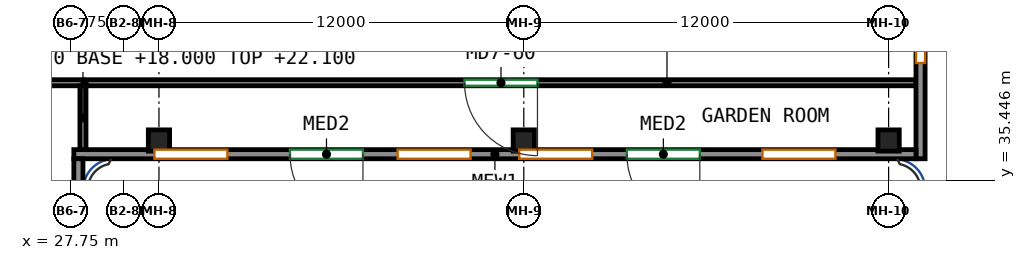
"""IFC4 building model, lengths in metres.
Left out: names, types, materials, properties, quantities, classifications, styles, units other than length and angle.
Written with IfcOpenShell. Run it as: python <this file> out.ifc"""

import sys

from ifc_helpers import new_model, si_unit, direction, frame, frame_2d, origin, origin_2d, place, context, subcontext, project, spatial, rectangle, extrude, source, transform, mapped, element, fill, save


model = new_model("IFC4")
c1 = context("Model", 3, precision=1e-05, world=origin(), true_north=direction((0.0, 1.0)))
c2 = subcontext(c1, "Body", "Model", "MODEL_VIEW")
j1 = project(units=[si_unit("LENGTHUNIT", "METRE"), si_unit("PLANEANGLEUNIT", "RADIAN")], contexts=[c1])
p1 = place(None, origin())
s1 = spatial("IfcSite", under=j1, at=p1, CompositionType="ELEMENT")
p2 = place(p1, origin())
s2 = spatial("IfcBuilding", under=s1, at=p2, CompositionType="ELEMENT")
p3 = place(p2, frame((0.0, 0.0, 18.0)))
s3 = spatial("IfcBuildingStorey", under=s2, at=p3, CompositionType="ELEMENT", Elevation=18.0)
m1 = source(origin(), c2, "Body", "SweptSolid", [
    extrude(rectangle(XDim=0.7, YDim=0.7, at=origin_2d()), origin(), (0.0, 0.0, 1.0), 4.1),
])
for number, where, z_axis, x_axis in (
    (1, (30.65, 36.75, 0.0), (0.0, 0.0, 1.0), (1.0, 0.0, 0.0)),
    (2, (42.65, 36.75, 0.0), (0.0, 0.0, 1.0), (1.0, 0.0, 0.0)),
    (3, (54.65, 36.75, 0.0), (0.0, 0.0, 1.0), (1.0, 0.0, 0.0)),
):
    element("IfcColumn", number, at=place(p3, frame(where, z_axis=z_axis, x_axis=x_axis)), inside=s3, PredefinedType="COLUMN", context=c2, shape_type="MappedRepresentation", body=[
        mapped(m1, transform((0.0, 0.0, 0.0))),
    ])
m2 = source(origin(), c2, "Body", "SweptSolid", [
    extrude(rectangle(XDim=20.7, YDim=0.3, at=frame_2d((10.35, 0.0))), origin(), (0.0, 0.0, 1.0), 4.1),
])
p4 = place(p3, frame((55.7, 56.85, 0.0), z_axis=(0.0, 0.0, 1.0), x_axis=(0.0, -1.0, 0.0)))
e4 = element("IfcWall", 4, at=p4, inside=s3, PredefinedType="SOLIDWALL", context=c2, shape_type="MappedRepresentation", body=[
    mapped(m2, transform((0.0, 0.0, 0.0))),
])
p5 = place(p4, frame((3.15, 0.0, 0.9)))
e5 = element("IfcOpeningElement", 5, at=p5, cuts=e4, PredefinedType="OPENING", context=c2, shape_type="SweptSolid", body=[
    extrude(rectangle(XDim=2.4, YDim=1.8, at=frame_2d((1.2, 0.9))), frame((0.0, 0.16, 0.0), z_axis=(0.0, -1.0, 0.0), x_axis=(1.0, 0.0, 0.0)), (0.0, 0.0, 1.0), 0.32),
])
p6 = place(p4, frame((7.15, 0.0, 0.9)))
e6 = element("IfcOpeningElement", 6, at=p6, cuts=e4, PredefinedType="OPENING", context=c2, shape_type="SweptSolid", body=[
    extrude(rectangle(XDim=2.4, YDim=1.8, at=frame_2d((1.2, 0.9))), frame((0.0, 0.16, 0.0), z_axis=(0.0, -1.0, 0.0), x_axis=(1.0, 0.0, 0.0)), (0.0, 0.0, 1.0), 0.32),
])
p7 = place(p4, frame((11.15, 0.0, 0.9)))
e7 = element("IfcOpeningElement", 7, at=p7, cuts=e4, PredefinedType="OPENING", context=c2, shape_type="SweptSolid", body=[
    extrude(rectangle(XDim=2.4, YDim=1.8, at=frame_2d((1.2, 0.9))), frame((0.0, 0.16, 0.0), z_axis=(0.0, -1.0, 0.0), x_axis=(1.0, 0.0, 0.0)), (0.0, 0.0, 1.0), 0.32),
])
p8 = place(p4, frame((15.15, 0.0, 0.9)))
e8 = element("IfcOpeningElement", 8, at=p8, cuts=e4, PredefinedType="OPENING", context=c2, shape_type="SweptSolid", body=[
    extrude(rectangle(XDim=2.4, YDim=1.8, at=frame_2d((1.2, 0.9))), frame((0.0, 0.16, 0.0), z_axis=(0.0, -1.0, 0.0), x_axis=(1.0, 0.0, 0.0)), (0.0, 0.0, 1.0), 0.32),
])
m3 = source(origin(), c2, "Body", "SweptSolid", [
    extrude(rectangle(XDim=27.7, YDim=0.3, at=frame_2d((13.85, 0.0))), origin(), (0.0, 0.0, 1.0), 4.1),
])
p9 = place(p3, frame((55.55, 36.3, 0.0), z_axis=(0.0, 0.0, 1.0), x_axis=(-1.0, 0.0, 0.0)))
e9 = element("IfcWall", 9, at=p9, inside=s3, PredefinedType="SOLIDWALL", context=c2, shape_type="MappedRepresentation", body=[
    mapped(m3, transform((0.0, 0.0, 0.0))),
])
p10 = place(p9, frame((7.11, 0.0, 0.0)))
e10 = element("IfcOpeningElement", 10, at=p10, cuts=e9, PredefinedType="OPENING", context=c2, shape_type="SweptSolid", body=[
    extrude(rectangle(XDim=2.4, YDim=2.4, at=frame_2d((1.2, 1.2))), frame((0.0, 0.16, 0.0), z_axis=(0.0, -1.0, 0.0), x_axis=(1.0, 0.0, 0.0)), (0.0, 0.0, 1.0), 0.32),
])
p11 = place(p9, frame((18.19, 0.0, 0.0)))
e11 = element("IfcOpeningElement", 11, at=p11, cuts=e9, PredefinedType="OPENING", context=c2, shape_type="SweptSolid", body=[
    extrude(rectangle(XDim=2.4, YDim=2.4, at=frame_2d((1.2, 1.2))), frame((0.0, 0.16, 0.0), z_axis=(0.0, -1.0, 0.0), x_axis=(1.0, 0.0, 0.0)), (0.0, 0.0, 1.0), 0.32),
])
p12 = place(p9, frame((2.65, 0.0, 0.9)))
e12 = element("IfcOpeningElement", 12, at=p12, cuts=e9, PredefinedType="OPENING", context=c2, shape_type="SweptSolid", body=[
    extrude(rectangle(XDim=2.4, YDim=1.8, at=frame_2d((1.2, 0.9))), frame((0.0, 0.16, 0.0), z_axis=(0.0, -1.0, 0.0), x_axis=(1.0, 0.0, 0.0)), (0.0, 0.0, 1.0), 0.32),
])
p13 = place(p9, frame((10.65, 0.0, 0.9)))
e13 = element("IfcOpeningElement", 13, at=p13, cuts=e9, PredefinedType="OPENING", context=c2, shape_type="SweptSolid", body=[
    extrude(rectangle(XDim=2.4, YDim=1.8, at=frame_2d((1.2, 0.9))), frame((0.0, 0.16, 0.0), z_axis=(0.0, -1.0, 0.0), x_axis=(1.0, 0.0, 0.0)), (0.0, 0.0, 1.0), 0.32),
])
p14 = place(p9, frame((14.65, 0.0, 0.9)))
e14 = element("IfcOpeningElement", 14, at=p14, cuts=e9, PredefinedType="OPENING", context=c2, shape_type="SweptSolid", body=[
    extrude(rectangle(XDim=2.4, YDim=1.8, at=frame_2d((1.2, 0.9))), frame((0.0, 0.16, 0.0), z_axis=(0.0, -1.0, 0.0), x_axis=(1.0, 0.0, 0.0)), (0.0, 0.0, 1.0), 0.32),
])
p15 = place(p9, frame((22.65, 0.0, 0.9)))
e15 = element("IfcOpeningElement", 15, at=p15, cuts=e9, PredefinedType="OPENING", context=c2, shape_type="SweptSolid", body=[
    extrude(rectangle(XDim=2.4, YDim=1.8, at=frame_2d((1.2, 0.9))), frame((0.0, 0.16, 0.0), z_axis=(0.0, -1.0, 0.0), x_axis=(1.0, 0.0, 0.0)), (0.0, 0.0, 1.0), 0.32),
])
m4 = source(origin(), c2, "Body", "SweptSolid", [
    extrude(rectangle(XDim=8.0, YDim=0.3, at=frame_2d((4.0, 0.0))), origin(), (0.0, 0.0, 1.0), 4.1),
])
p16 = place(p3, frame((28.0, 36.15, 0.0), z_axis=(0.0, 0.0, 1.0), x_axis=(0.0, -1.0, 0.0)))
e16 = element("IfcWall", 16, at=p16, inside=s3, PredefinedType="SOLIDWALL", context=c2, shape_type="MappedRepresentation", body=[
    mapped(m4, transform((0.0, 0.0, 0.0))),
])
p17 = place(p16, frame((2.8, 0.0, 0.9)))
e17 = element("IfcOpeningElement", 17, at=p17, cuts=e16, PredefinedType="OPENING", context=c2, shape_type="SweptSolid", body=[
    extrude(rectangle(XDim=2.4, YDim=1.8, at=frame_2d((1.2, 0.9))), frame((0.0, 0.16, 0.0), z_axis=(0.0, -1.0, 0.0), x_axis=(1.0, 0.0, 0.0)), (0.0, 0.0, 1.0), 0.32),
])
m5 = source(origin(), c2, "Body", "SweptSolid", [
    extrude(rectangle(XDim=18.05, YDim=0.2, at=frame_2d((9.025, 0.0))), origin(), (0.0, 0.0, 1.0), 3.3),
])
p18 = place(p3, frame((28.15, 38.65, 0.0), z_axis=(0.0, 0.0, 1.0), x_axis=(-1.0, 0.0, 0.0)))
e18 = element("IfcWall", 18, at=p18, inside=s3, PredefinedType="PARTITIONING", context=c2, shape_type="MappedRepresentation", body=[
    mapped(m5, transform((0.0, 0.0, 0.0))),
])
p19 = place(p18, frame((7.825, 0.0, 0.0)))
e19 = element("IfcOpeningElement", 19, at=p19, cuts=e18, PredefinedType="OPENING", context=c2, shape_type="SweptSolid", body=[
    extrude(rectangle(XDim=2.4, YDim=2.4, at=frame_2d((1.2, 1.2))), frame((0.0, 0.11, 0.0), z_axis=(0.0, -1.0, 0.0), x_axis=(1.0, 0.0, 0.0)), (0.0, 0.0, 1.0), 0.22),
])
m6 = source(origin(), c2, "Body", "SweptSolid", [
    extrude(rectangle(XDim=2.1, YDim=0.2, at=frame_2d((1.05, 0.0))), origin(), (0.0, 0.0, 1.0), 4.1),
])
p20 = place(p3, frame((28.15, 38.55, 0.0), z_axis=(0.0, 0.0, 1.0), x_axis=(0.0, -1.0, 0.0)))
e20 = element("IfcWall", 20, at=p20, inside=s3, PredefinedType="PARTITIONING", context=c2, shape_type="MappedRepresentation", body=[
    mapped(m6, transform((0.0, 0.0, 0.0))),
])
m7 = source(origin(), c2, "Body", "SweptSolid", [
    extrude(rectangle(XDim=27.3, YDim=0.2, at=frame_2d((13.65, 0.0))), origin(), (0.0, 0.0, 1.0), 2.8),
])
p21 = place(p3, frame((55.55, 38.65, 0.0), z_axis=(0.0, 0.0, 1.0), x_axis=(-1.0, 0.0, 0.0)))
e21 = element("IfcWall", 21, at=p21, inside=s3, PredefinedType="PARTITIONING", context=c2, shape_type="MappedRepresentation", body=[
    mapped(m7, transform((0.0, 0.0, 0.0))),
])
p22 = place(p21, frame((12.45, 0.0, 0.0)))
e22 = element("IfcOpeningElement", 22, at=p22, cuts=e21, PredefinedType="OPENING", context=c2, shape_type="SweptSolid", body=[
    extrude(rectangle(XDim=2.4, YDim=2.4, at=frame_2d((1.2, 1.2))), frame((0.0, 0.11, 0.0), z_axis=(0.0, -1.0, 0.0), x_axis=(1.0, 0.0, 0.0)), (0.0, 0.0, 1.0), 0.22),
])
p23 = place(p10, origin())
e23 = element("IfcDoor", 23, at=p23, inside=s3, OperationType="DOUBLE_DOOR_SINGLE_SWING", PredefinedType="DOOR", context=c2, shape_type="SweptSolid", body=[
    extrude(rectangle(XDim=2.4, YDim=2.4, at=frame_2d((1.2, 1.2))), frame((0.0, 0.025, 0.0), z_axis=(0.0, -1.0, 0.0), x_axis=(1.0, 0.0, 0.0)), (0.0, 0.0, 1.0), 0.05),
])
fill(e10, e23)
p24 = place(p11, origin())
e24 = element("IfcDoor", 24, at=p24, inside=s3, OperationType="DOUBLE_DOOR_SINGLE_SWING", PredefinedType="DOOR", context=c2, shape_type="SweptSolid", body=[
    extrude(rectangle(XDim=2.4, YDim=2.4, at=frame_2d((1.2, 1.2))), frame((0.0, 0.025, 0.0), z_axis=(0.0, -1.0, 0.0), x_axis=(1.0, 0.0, 0.0)), (0.0, 0.0, 1.0), 0.05),
])
fill(e11, e24)
p25 = place(p8, origin())
e25 = element("IfcWindow", 25, at=p25, inside=s3, PartitioningType="SINGLE_PANEL", PredefinedType="WINDOW", context=c2, shape_type="SweptSolid", body=[
    extrude(rectangle(XDim=2.4, YDim=1.8, at=frame_2d((1.2, 0.9))), frame((0.0, 0.03, 0.0), z_axis=(0.0, -1.0, 0.0), x_axis=(1.0, 0.0, 0.0)), (0.0, 0.0, 1.0), 0.06),
])
fill(e8, e25)
p26 = place(p12, origin())
e26 = element("IfcWindow", 26, at=p26, inside=s3, PartitioningType="SINGLE_PANEL", PredefinedType="WINDOW", context=c2, shape_type="SweptSolid", body=[
    extrude(rectangle(XDim=2.4, YDim=1.8, at=frame_2d((1.2, 0.9))), frame((0.0, 0.03, 0.0), z_axis=(0.0, -1.0, 0.0), x_axis=(1.0, 0.0, 0.0)), (0.0, 0.0, 1.0), 0.06),
])
fill(e12, e26)
p27 = place(p13, origin())
e27 = element("IfcWindow", 27, at=p27, inside=s3, PartitioningType="SINGLE_PANEL", PredefinedType="WINDOW", context=c2, shape_type="SweptSolid", body=[
    extrude(rectangle(XDim=2.4, YDim=1.8, at=frame_2d((1.2, 0.9))), frame((0.0, 0.03, 0.0), z_axis=(0.0, -1.0, 0.0), x_axis=(1.0, 0.0, 0.0)), (0.0, 0.0, 1.0), 0.06),
])
fill(e13, e27)
p28 = place(p14, origin())
e28 = element("IfcWindow", 28, at=p28, inside=s3, PartitioningType="SINGLE_PANEL", PredefinedType="WINDOW", context=c2, shape_type="SweptSolid", body=[
    extrude(rectangle(XDim=2.4, YDim=1.8, at=frame_2d((1.2, 0.9))), frame((0.0, 0.03, 0.0), z_axis=(0.0, -1.0, 0.0), x_axis=(1.0, 0.0, 0.0)), (0.0, 0.0, 1.0), 0.06),
])
fill(e14, e28)
p29 = place(p15, origin())
e29 = element("IfcWindow", 29, at=p29, inside=s3, PartitioningType="SINGLE_PANEL", PredefinedType="WINDOW", context=c2, shape_type="SweptSolid", body=[
    extrude(rectangle(XDim=2.4, YDim=1.8, at=frame_2d((1.2, 0.9))), frame((0.0, 0.03, 0.0), z_axis=(0.0, -1.0, 0.0), x_axis=(1.0, 0.0, 0.0)), (0.0, 0.0, 1.0), 0.06),
])
fill(e15, e29)
p30 = place(p22, origin())
e30 = element("IfcDoor", 30, at=p30, inside=s3, OperationType="DOUBLE_DOOR_SINGLE_SWING", PredefinedType="DOOR", context=c2, shape_type="SweptSolid", body=[
    extrude(rectangle(XDim=2.4, YDim=2.4, at=frame_2d((1.2, 1.2))), frame((0.0, 0.025, 0.0), z_axis=(0.0, -1.0, 0.0), x_axis=(1.0, 0.0, 0.0)), (0.0, 0.0, 1.0), 0.05),
])
fill(e22, e30)
save(model, sys.argv[1])
